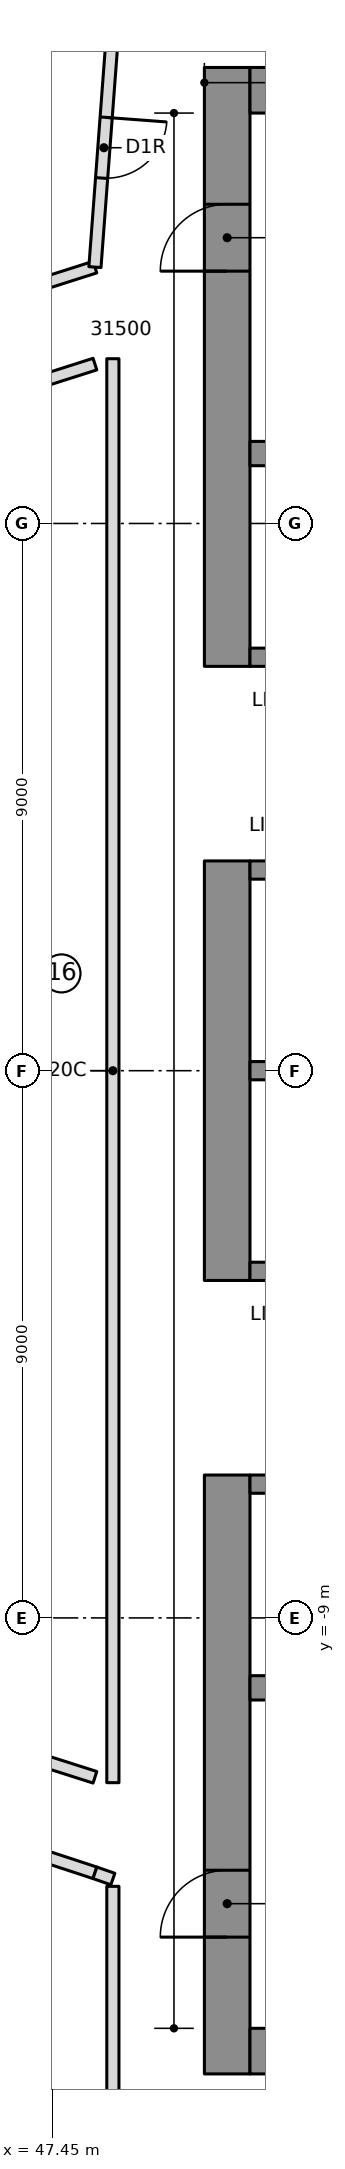
"""IFC4 building model, lengths in metres.
Left out: names, types, materials, properties, quantities, classifications, styles, units other than length and angle.
Written with IfcOpenShell. Run it as: python <this file> out.ifc"""

import sys

from ifc_helpers import new_model, si_unit, direction, frame, frame_2d, origin, place, context, subcontext, project, spatial, rectangle, extrude, element, fill, save


model = new_model("IFC4")
c1 = context("Model", 3, precision=1e-05, world=origin(), true_north=direction((0.0, 1.0)))
c2 = subcontext(c1, "Body", "Model", "MODEL_VIEW")
j1 = project(units=[si_unit("LENGTHUNIT", "METRE"), si_unit("PLANEANGLEUNIT", "RADIAN")], contexts=[c1])
p1 = place(None, origin())
s1 = spatial("IfcSite", under=j1, at=p1, CompositionType="ELEMENT")
p2 = place(p1, origin())
s2 = spatial("IfcBuilding", under=s1, at=p2, CompositionType="ELEMENT")
p3 = place(p2, frame((0.0, 0.0, 207.45)))
s3 = spatial("IfcBuildingStorey", under=s2, at=p3, CompositionType="ELEMENT", Elevation=207.45)
p4 = place(p3, frame((50.325, 6.65, 0.0), z_axis=(0.0, 0.0, 1.0), x_axis=(0.0, 1.0, 0.0)))
e1 = element("IfcWall", 1, at=p4, inside=s3, PredefinedType="SHEAR", context=c2, shape_type="SweptSolid", body=[
    extrude(rectangle(XDim=9.85, YDim=0.75, at=frame_2d((4.925, 0.0))), origin(), (0.0, 0.0, 1.0), 3.55),
])
p5 = place(p4, frame((6.5, 0.0, 0.0)))
e2 = element("IfcOpeningElement", 2, at=p5, cuts=e1, PredefinedType="OPENING", context=c2, shape_type="SweptSolid", body=[
    extrude(rectangle(XDim=1.1, YDim=2.1, at=frame_2d((0.55, 1.05))), frame((0.0, 0.385, 0.0), z_axis=(0.0, -1.0, 0.0), x_axis=(1.0, 0.0, 0.0)), (0.0, 0.0, 1.0), 0.77),
])
p6 = place(p3, frame((50.325, -3.45, 0.0), z_axis=(0.0, 0.0, 1.0), x_axis=(0.0, 1.0, 0.0)))
e3 = element("IfcWall", 3, at=p6, inside=s3, PredefinedType="SHEAR", context=c2, shape_type="SweptSolid", body=[
    extrude(rectangle(XDim=6.9, YDim=0.75, at=frame_2d((3.45, 0.0))), origin(), (0.0, 0.0, 1.0), 3.55),
])
p7 = place(p3, frame((50.325, -16.5, 0.0), z_axis=(0.0, 0.0, 1.0), x_axis=(0.0, 1.0, 0.0)))
e4 = element("IfcWall", 4, at=p7, inside=s3, PredefinedType="SHEAR", context=c2, shape_type="SweptSolid", body=[
    extrude(rectangle(XDim=9.85, YDim=0.75, at=frame_2d((4.925, 0.0))), origin(), (0.0, 0.0, 1.0), 3.55),
])
p8 = place(p7, frame((2.25, 0.0, 0.0)))
e5 = element("IfcOpeningElement", 5, at=p8, cuts=e4, PredefinedType="OPENING", context=c2, shape_type="SweptSolid", body=[
    extrude(rectangle(XDim=1.1, YDim=2.1, at=frame_2d((0.55, 1.05))), frame((0.0, 0.385, 0.0), z_axis=(0.0, -1.0, 0.0), x_axis=(1.0, 0.0, 0.0)), (0.0, 0.0, 1.0), 0.77),
])
for number, where, z_axis, x_axis in (
    (6, (50.7, 16.125, 0.0), (0.0, 0.0, 1.0), (1.0, 0.0, 0.0)),
    (7, (50.7, -16.125, 0.0), (0.0, 0.0, 1.0), (1.0, 0.0, 0.0)),
):
    element("IfcWall", number, at=place(p3, frame(where, z_axis=z_axis, x_axis=x_axis)), inside=s3, PredefinedType="SHEAR", context=c2, shape_type="SweptSolid", body=[
        extrude(rectangle(XDim=13.77, YDim=0.75, at=frame_2d((6.885, 0.0))), origin(), (0.0, 0.0, 1.0), 3.55),
    ])
p9 = place(p3, frame((50.7, 10.15, 0.0), z_axis=(0.0, 0.0, 1.0), x_axis=(1.0, 0.0, 0.0)))
e8 = element("IfcWall", 8, at=p9, inside=s3, PredefinedType="SHEAR", context=c2, shape_type="SweptSolid", body=[
    extrude(rectangle(XDim=13.02, YDim=0.4, at=frame_2d((6.51, 0.0))), origin(), (0.0, 0.0, 1.0), 3.55),
])
p10 = place(p9, frame((0.7, 0.0, 0.0)))
e9 = element("IfcOpeningElement", 9, at=p10, cuts=e8, PredefinedType="OPENING", context=c2, shape_type="SweptSolid", body=[
    extrude(rectangle(XDim=1.1, YDim=2.1, at=frame_2d((0.55, 1.05))), frame((0.0, 0.21, 0.0), z_axis=(0.0, -1.0, 0.0), x_axis=(1.0, 0.0, 0.0)), (0.0, 0.0, 1.0), 0.42),
])
p11 = place(p9, frame((3.5, 0.0, 0.0)))
e10 = element("IfcOpeningElement", 10, at=p11, cuts=e8, PredefinedType="OPENING", context=c2, shape_type="SweptSolid", body=[
    extrude(rectangle(XDim=1.1, YDim=2.1, at=frame_2d((0.55, 1.05))), frame((0.0, 0.21, 0.0), z_axis=(0.0, -1.0, 0.0), x_axis=(1.0, 0.0, 0.0)), (0.0, 0.0, 1.0), 0.42),
])
p12 = place(p3, frame((50.7, -10.15, 0.0), z_axis=(0.0, 0.0, 1.0), x_axis=(1.0, 0.0, 0.0)))
e11 = element("IfcWall", 11, at=p12, inside=s3, PredefinedType="SHEAR", context=c2, shape_type="SweptSolid", body=[
    extrude(rectangle(XDim=13.02, YDim=0.4, at=frame_2d((6.51, 0.0))), origin(), (0.0, 0.0, 1.0), 3.55),
])
p13 = place(p3, frame((50.7, 0.0, 0.0), z_axis=(0.0, 0.0, 1.0), x_axis=(1.0, 0.0, 0.0)))
e12 = element("IfcWall", 12, at=p13, inside=s3, PredefinedType="SHEAR", context=c2, shape_type="SweptSolid", body=[
    extrude(rectangle(XDim=10.9, YDim=0.3, at=frame_2d((5.45, 0.0))), origin(), (0.0, 0.0, 1.0), 3.55),
])
p14 = place(p3, frame((50.7, 3.3, 0.0), z_axis=(0.0, 0.0, 1.0), x_axis=(1.0, 0.0, 0.0)))
e13 = element("IfcWall", 13, at=p14, inside=s3, PredefinedType="SHEAR", context=c2, shape_type="SweptSolid", body=[
    extrude(rectangle(XDim=10.9, YDim=0.3, at=frame_2d((5.45, 0.0))), origin(), (0.0, 0.0, 1.0), 3.55),
])
p15 = place(p14, frame((0.7, 0.0, 0.0)))
e14 = element("IfcOpeningElement", 14, at=p15, cuts=e13, PredefinedType="OPENING", context=c2, shape_type="SweptSolid", body=[
    extrude(rectangle(XDim=1.1, YDim=2.1, at=frame_2d((0.55, 1.05))), frame((0.0, 0.16, 0.0), z_axis=(0.0, -1.0, 0.0), x_axis=(1.0, 0.0, 0.0)), (0.0, 0.0, 1.0), 0.32),
])
p16 = place(p14, frame((3.5, 0.0, 0.0)))
e15 = element("IfcOpeningElement", 15, at=p16, cuts=e13, PredefinedType="OPENING", context=c2, shape_type="SweptSolid", body=[
    extrude(rectangle(XDim=1.1, YDim=2.1, at=frame_2d((0.55, 1.05))), frame((0.0, 0.16, 0.0), z_axis=(0.0, -1.0, 0.0), x_axis=(1.0, 0.0, 0.0)), (0.0, 0.0, 1.0), 0.32),
])
p17 = place(p14, frame((6.3, 0.0, 0.0)))
e16 = element("IfcOpeningElement", 16, at=p17, cuts=e13, PredefinedType="OPENING", context=c2, shape_type="SweptSolid", body=[
    extrude(rectangle(XDim=1.1, YDim=2.1, at=frame_2d((0.55, 1.05))), frame((0.0, 0.16, 0.0), z_axis=(0.0, -1.0, 0.0), x_axis=(1.0, 0.0, 0.0)), (0.0, 0.0, 1.0), 0.32),
])
p18 = place(p14, frame((9.1, 0.0, 0.0)))
e17 = element("IfcOpeningElement", 17, at=p18, cuts=e13, PredefinedType="OPENING", context=c2, shape_type="SweptSolid", body=[
    extrude(rectangle(XDim=1.1, YDim=2.1, at=frame_2d((0.55, 1.05))), frame((0.0, 0.16, 0.0), z_axis=(0.0, -1.0, 0.0), x_axis=(1.0, 0.0, 0.0)), (0.0, 0.0, 1.0), 0.32),
])
p19 = place(p3, frame((50.7, 6.8, 0.0), z_axis=(0.0, 0.0, 1.0), x_axis=(1.0, 0.0, 0.0)))
e18 = element("IfcWall", 18, at=p19, inside=s3, PredefinedType="SHEAR", context=c2, shape_type="SweptSolid", body=[
    extrude(rectangle(XDim=10.9, YDim=0.3, at=frame_2d((5.45, 0.0))), origin(), (0.0, 0.0, 1.0), 3.55),
])
p20 = place(p19, frame((6.4, 0.0, 0.0)))
e19 = element("IfcOpeningElement", 19, at=p20, cuts=e18, PredefinedType="OPENING", context=c2, shape_type="SweptSolid", body=[
    extrude(rectangle(XDim=0.9, YDim=2.1, at=frame_2d((0.45, 1.05))), frame((0.0, 0.16, 0.0), z_axis=(0.0, -1.0, 0.0), x_axis=(1.0, 0.0, 0.0)), (0.0, 0.0, 1.0), 0.32),
])
p21 = place(p19, frame((9.2, 0.0, 0.0)))
e20 = element("IfcOpeningElement", 20, at=p21, cuts=e18, PredefinedType="OPENING", context=c2, shape_type="SweptSolid", body=[
    extrude(rectangle(XDim=0.9, YDim=2.1, at=frame_2d((0.45, 1.05))), frame((0.0, 0.16, 0.0), z_axis=(0.0, -1.0, 0.0), x_axis=(1.0, 0.0, 0.0)), (0.0, 0.0, 1.0), 0.32),
])
p22 = place(p3, frame((50.7, -3.3, 0.0), z_axis=(0.0, 0.0, 1.0), x_axis=(1.0, 0.0, 0.0)))
e21 = element("IfcWall", 21, at=p22, inside=s3, PredefinedType="SHEAR", context=c2, shape_type="SweptSolid", body=[
    extrude(rectangle(XDim=10.9, YDim=0.3, at=frame_2d((5.45, 0.0))), origin(), (0.0, 0.0, 1.0), 3.55),
])
p23 = place(p22, frame((9.1, 0.0, 0.0)))
e22 = element("IfcOpeningElement", 22, at=p23, cuts=e21, PredefinedType="OPENING", context=c2, shape_type="SweptSolid", body=[
    extrude(rectangle(XDim=1.1, YDim=2.1, at=frame_2d((0.55, 1.05))), frame((0.0, 0.16, 0.0), z_axis=(0.0, -1.0, 0.0), x_axis=(1.0, 0.0, 0.0)), (0.0, 0.0, 1.0), 0.32),
])
p24 = place(p3, frame((50.7, -6.8, 0.0), z_axis=(0.0, 0.0, 1.0), x_axis=(1.0, 0.0, 0.0)))
e23 = element("IfcWall", 23, at=p24, inside=s3, PredefinedType="SHEAR", context=c2, shape_type="SweptSolid", body=[
    extrude(rectangle(XDim=10.9, YDim=0.3, at=frame_2d((5.45, 0.0))), origin(), (0.0, 0.0, 1.0), 3.55),
])
p25 = place(p24, frame((6.3, 0.0, 0.0)))
e24 = element("IfcOpeningElement", 24, at=p25, cuts=e23, PredefinedType="OPENING", context=c2, shape_type="SweptSolid", body=[
    extrude(rectangle(XDim=1.1, YDim=2.1, at=frame_2d((0.55, 1.05))), frame((0.0, 0.16, 0.0), z_axis=(0.0, -1.0, 0.0), x_axis=(1.0, 0.0, 0.0)), (0.0, 0.0, 1.0), 0.32),
])
p26 = place(p24, frame((9.1, 0.0, 0.0)))
e25 = element("IfcOpeningElement", 25, at=p26, cuts=e23, PredefinedType="OPENING", context=c2, shape_type="SweptSolid", body=[
    extrude(rectangle(XDim=1.1, YDim=2.1, at=frame_2d((0.55, 1.05))), frame((0.0, 0.16, 0.0), z_axis=(0.0, -1.0, 0.0), x_axis=(1.0, 0.0, 0.0)), (0.0, 0.0, 1.0), 0.32),
])
p27 = place(p24, frame((0.8, 0.0, 0.0)))
e26 = element("IfcOpeningElement", 26, at=p27, cuts=e23, PredefinedType="OPENING", context=c2, shape_type="SweptSolid", body=[
    extrude(rectangle(XDim=0.9, YDim=2.1, at=frame_2d((0.45, 1.05))), frame((0.0, 0.16, 0.0), z_axis=(0.0, -1.0, 0.0), x_axis=(1.0, 0.0, 0.0)), (0.0, 0.0, 1.0), 0.32),
])
p28 = place(p24, frame((3.6, 0.0, 0.0)))
e27 = element("IfcOpeningElement", 27, at=p28, cuts=e23, PredefinedType="OPENING", context=c2, shape_type="SweptSolid", body=[
    extrude(rectangle(XDim=0.9, YDim=2.1, at=frame_2d((0.45, 1.05))), frame((0.0, 0.16, 0.0), z_axis=(0.0, -1.0, 0.0), x_axis=(1.0, 0.0, 0.0)), (0.0, 0.0, 1.0), 0.32),
])
p29 = place(p3, frame((48.15, 13.217, 0.0), z_axis=(0.0, 0.0, 1.0), x_axis=(-0.952731090451, -0.303814860215, 0.0)))
e28 = element("IfcWall", 28, at=p29, inside=s3, PredefinedType="PARTITIONING", context=c2, shape_type="SweptSolid", body=[
    extrude(rectangle(XDim=1.088, YDim=0.2, at=frame_2d((0.544, 0.0))), origin(), (0.0, 0.0, 1.0), 3.15),
])
p30 = place(p3, frame((43.026, -11.507, 0.0), z_axis=(0.0, 0.0, 1.0), x_axis=(0.949951949432, -0.312396052744, 0.0)))
e29 = element("IfcWall", 29, at=p30, inside=s3, PredefinedType="PARTITIONING", context=c2, shape_type="SweptSolid", body=[
    extrude(rectangle(XDim=5.394, YDim=0.2, at=frame_2d((2.697, 0.0))), origin(), (0.0, 0.0, 1.0), 3.15),
])
p31 = place(p30, frame((3.05, 0.0, 0.0)))
e30 = element("IfcOpeningElement", 30, at=p31, cuts=e29, PredefinedType="OPENING", context=c2, shape_type="SweptSolid", body=[
    extrude(rectangle(XDim=1.0, YDim=2.1, at=frame_2d((0.5, 1.05))), frame((0.0, 0.11, 0.0), z_axis=(0.0, -1.0, 0.0), x_axis=(1.0, 0.0, 0.0)), (0.0, 0.0, 1.0), 0.22),
])
for number, where, z_axis, x_axis in (
    (31, (46.881, 11.217, 0.0), (0.0, 0.0, 1.0), (0.953, 0.304, 0.0)),
    (32, (48.15, -11.621, 0.0), (0.0, 0.0, 1.0), (-0.953, 0.304, 0.0)),
):
    element("IfcWall", number, at=place(p3, frame(where, z_axis=z_axis, x_axis=x_axis)), inside=s3, PredefinedType="PARTITIONING", context=c2, shape_type="SweptSolid", body=[
        extrude(rectangle(XDim=1.332, YDim=0.2, at=frame_2d((0.666, 0.0))), origin(), (0.0, 0.0, 1.0), 3.15),
    ])
p32 = place(p3, frame((48.445, 17.145, 0.0), z_axis=(0.0, 0.0, 1.0), x_axis=(-0.074933243819, -0.997188552366, 0.0)))
e33 = element("IfcWall", 33, at=p32, inside=s3, PredefinedType="PARTITIONING", context=c2, shape_type="SweptSolid", body=[
    extrude(rectangle(XDim=3.939, YDim=0.2, at=frame_2d((1.969, 0.0))), origin(), (0.0, 0.0, 1.0), 3.15),
])
p33 = place(p32, frame((1.47, 0.0, 0.0)))
e34 = element("IfcOpeningElement", 34, at=p33, cuts=e33, PredefinedType="OPENING", context=c2, shape_type="SweptSolid", body=[
    extrude(rectangle(XDim=1.0, YDim=2.1, at=frame_2d((0.5, 1.05))), frame((0.0, 0.11, 0.0), z_axis=(0.0, -1.0, 0.0), x_axis=(1.0, 0.0, 0.0)), (0.0, 0.0, 1.0), 0.22),
])
p34 = place(p3, frame((48.445, 11.71, 0.0), z_axis=(0.0, 0.0, 1.0), x_axis=(0.0, -1.0, 0.0)))
e35 = element("IfcWall", 35, at=p34, inside=s3, PredefinedType="PARTITIONING", context=c2, shape_type="SweptSolid", body=[
    extrude(rectangle(XDim=23.42, YDim=0.2, at=frame_2d((11.71, 0.0))), origin(), (0.0, 0.0, 1.0), 3.15),
])
p35 = place(p3, frame((48.15, -13.192, 0.0), z_axis=(0.0, 0.0, 1.0), x_axis=(0.944623214561, -0.328156947987, 0.0)))
e36 = element("IfcWall", 36, at=p35, inside=s3, PredefinedType="PARTITIONING", context=c2, shape_type="SweptSolid", body=[
    extrude(rectangle(XDim=0.312, YDim=0.2, at=frame_2d((0.156, 0.0))), origin(), (0.0, 0.0, 1.0), 3.15),
])
p36 = place(p3, frame((48.445, -13.415, 0.0), z_axis=(0.0, 0.0, 1.0), x_axis=(0.0, -1.0, 0.0)))
e37 = element("IfcWall", 37, at=p36, inside=s3, PredefinedType="PARTITIONING", context=c2, shape_type="SweptSolid", body=[
    extrude(rectangle(XDim=6.935, YDim=0.2, at=frame_2d((3.468, 0.0))), origin(), (0.0, 0.0, 1.0), 3.15),
])
p37 = place(p33, origin())
e38 = element("IfcDoor", 38, at=p37, inside=s3, OperationType="SINGLE_SWING_RIGHT", PredefinedType="DOOR", context=c2, shape_type="SweptSolid", body=[
    extrude(rectangle(XDim=1.0, YDim=2.1, at=frame_2d((0.5, 1.05))), frame((0.0, 0.025, 0.0), z_axis=(0.0, -1.0, 0.0), x_axis=(1.0, 0.0, 0.0)), (0.0, 0.0, 1.0), 0.05),
])
fill(e34, e38)
p38 = place(p5, origin())
e39 = element("IfcDoor", 39, at=p38, inside=s3, OperationType="SINGLE_SWING_RIGHT", PredefinedType="DOOR", context=c2, shape_type="SweptSolid", body=[
    extrude(rectangle(XDim=1.1, YDim=2.1, at=frame_2d((0.55, 1.05))), frame((0.0, 0.025, 0.0), z_axis=(0.0, -1.0, 0.0), x_axis=(1.0, 0.0, 0.0)), (0.0, 0.0, 1.0), 0.05),
])
fill(e2, e39)
p39 = place(p8, origin())
e40 = element("IfcDoor", 40, at=p39, inside=s3, OperationType="SINGLE_SWING_RIGHT", PredefinedType="DOOR", context=c2, shape_type="SweptSolid", body=[
    extrude(rectangle(XDim=1.1, YDim=2.1, at=frame_2d((0.55, 1.05))), frame((0.0, 0.025, 0.0), z_axis=(0.0, -1.0, 0.0), x_axis=(1.0, 0.0, 0.0)), (0.0, 0.0, 1.0), 0.05),
])
fill(e5, e40)
save(model, sys.argv[1])
